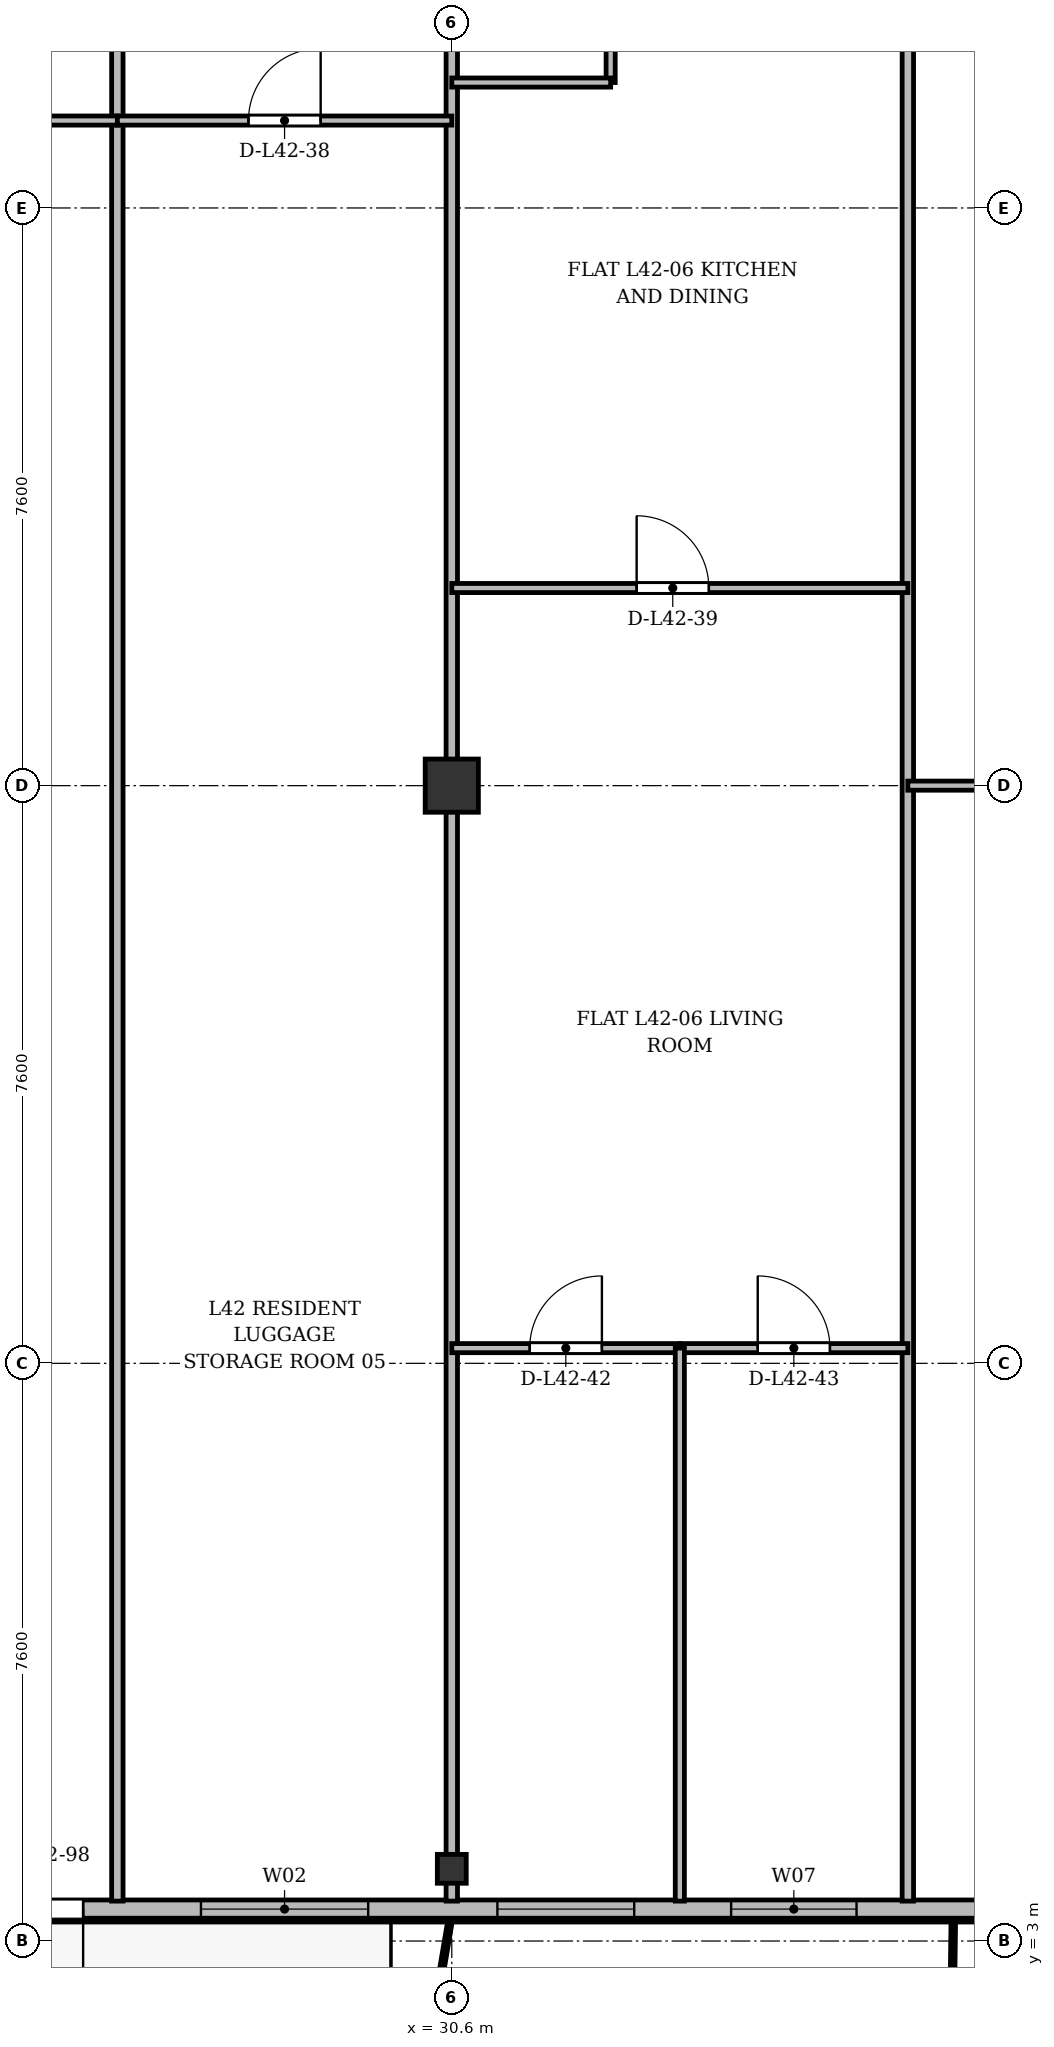
"""IFC4 building model, lengths in metres.
Left out: names, types, materials, properties, quantities, classifications, styles, units other than length and angle.
Written with IfcOpenShell. Run it as: python <this file> out.ifc"""

import sys

from ifc_helpers import new_model, si_unit, direction, frame, frame_2d, origin, origin_2d, place, context, subcontext, project, spatial, rectangle, i_section, extrude, source, transform, mapped, element, fill, save


model = new_model("IFC4")
c1 = context("Model", 3, precision=1e-05, world=origin(), true_north=direction((0.0, 1.0)))
c2 = subcontext(c1, "Body", "Model", "MODEL_VIEW")
j1 = project(units=[si_unit("LENGTHUNIT", "METRE"), si_unit("PLANEANGLEUNIT", "RADIAN")], contexts=[c1])
p1 = place(None, origin())
s1 = spatial("IfcSite", under=j1, at=p1, CompositionType="ELEMENT")
p2 = place(p1, origin())
s2 = spatial("IfcBuilding", under=s1, at=p2, CompositionType="ELEMENT")
p3 = place(p2, frame((0.0, 0.0, 160.9)))
s3 = spatial("IfcBuildingStorey", under=s2, at=p3, CompositionType="ELEMENT", Elevation=160.9)
m1 = source(origin(), c2, "Body", "SweptSolid", [
    extrude(i_section(OverallWidth=0.38, OverallDepth=0.38, WebThickness=0.02, FlangeThickness=0.03, at=origin_2d()), origin(), (0.0, 0.0, 1.0), 3.6),
])
p4 = place(p3, frame((30.6, 3.95, 0.0), z_axis=(0.0, 0.0, 1.0), x_axis=(1.0, 0.0, 0.0)))
e1 = element("IfcColumn", 1, at=p4, inside=s3, PredefinedType="COLUMN", context=c2, shape_type="MappedRepresentation", body=[
    mapped(m1, transform((0.0, 0.0, 0.0), x_axis=(1.0, 0.0, 0.0), y_axis=(0.0, 1.0, 0.0), z_axis=(0.0, 0.0, 1.0), scale=1.0)),
])
m2 = source(origin(), c2, "Body", "SweptSolid", [
    extrude(rectangle(XDim=0.7, YDim=0.7, at=origin_2d()), origin(), (0.0, 0.0, 1.0), 3.6),
])
p5 = place(p3, frame((30.6, 18.2, 0.0), z_axis=(0.0, 0.0, 1.0), x_axis=(1.0, 0.0, 0.0)))
e2 = element("IfcColumn", 2, at=p5, inside=s3, PredefinedType="COLUMN", context=c2, shape_type="MappedRepresentation", body=[
    mapped(m2, transform((0.0, 0.0, 0.0), x_axis=(1.0, 0.0, 0.0), y_axis=(0.0, 1.0, 0.0), z_axis=(0.0, 0.0, 1.0), scale=1.0)),
])
p6 = place(p3, frame((63.6, 3.42, 0.0), z_axis=(0.0, 0.0, 1.0), x_axis=(-1.0, 0.0, 0.0)))
e3 = element("IfcWall", 3, at=p6, inside=s3, PredefinedType="SOLIDWALL", context=c2, shape_type="SweptSolid", body=[
    extrude(rectangle(XDim=52.8, YDim=0.24, at=frame_2d((26.4, 0.0))), origin(), (0.0, 0.0, 1.0), 3.35),
])
p7 = place(p6, frame((0.295, 0.0, 0.9)))
e4 = element("IfcOpeningElement", 4, at=p7, cuts=e3, PredefinedType="OPENING", context=c2, shape_type="SweptSolid", body=[
    extrude(rectangle(XDim=1.5, YDim=1.75, at=frame_2d((0.75, 0.875))), frame((0.0, 0.13, 0.0), z_axis=(0.0, -1.0, 0.0), x_axis=(1.0, 0.0, 0.0)), (0.0, 0.0, 1.0), 0.26),
])
p8 = place(p6, frame((3.7, 0.0, 0.9)))
e5 = element("IfcOpeningElement", 5, at=p8, cuts=e3, PredefinedType="OPENING", context=c2, shape_type="SweptSolid", body=[
    extrude(rectangle(XDim=2.0, YDim=1.95, at=frame_2d((1.0, 0.975))), frame((0.0, 0.13, 0.0), z_axis=(0.0, -1.0, 0.0), x_axis=(1.0, 0.0, 0.0)), (0.0, 0.0, 1.0), 0.26),
])
p9 = place(p6, frame((7.635, 0.0, 0.0)))
e6 = element("IfcOpeningElement", 6, at=p9, cuts=e3, PredefinedType="OPENING", context=c2, shape_type="SweptSolid", body=[
    extrude(rectangle(XDim=1.2, YDim=2.2, at=frame_2d((0.6, 1.1))), frame((0.0, 0.13, 0.0), z_axis=(0.0, -1.0, 0.0), x_axis=(1.0, 0.0, 0.0)), (0.0, 0.0, 1.0), 0.26),
])
p10 = place(p6, frame((9.7, 0.0, 0.9)))
e7 = element("IfcOpeningElement", 7, at=p10, cuts=e3, PredefinedType="OPENING", context=c2, shape_type="SweptSolid", body=[
    extrude(rectangle(XDim=1.8, YDim=1.8, at=frame_2d((0.9, 0.9))), frame((0.0, 0.13, 0.0), z_axis=(0.0, -1.0, 0.0), x_axis=(1.0, 0.0, 0.0)), (0.0, 0.0, 1.0), 0.26),
])
p11 = place(p6, frame((12.25, 0.0, 0.9)))
e8 = element("IfcOpeningElement", 8, at=p11, cuts=e3, PredefinedType="OPENING", context=c2, shape_type="SweptSolid", body=[
    extrude(rectangle(XDim=1.5, YDim=1.75, at=frame_2d((0.75, 0.875))), frame((0.0, 0.13, 0.0), z_axis=(0.0, -1.0, 0.0), x_axis=(1.0, 0.0, 0.0)), (0.0, 0.0, 1.0), 0.26),
])
p12 = place(p6, frame((16.25, 0.0, 0.9)))
e9 = element("IfcOpeningElement", 9, at=p12, cuts=e3, PredefinedType="OPENING", context=c2, shape_type="SweptSolid", body=[
    extrude(rectangle(XDim=1.5, YDim=1.75, at=frame_2d((0.75, 0.875))), frame((0.0, 0.13, 0.0), z_axis=(0.0, -1.0, 0.0), x_axis=(1.0, 0.0, 0.0)), (0.0, 0.0, 1.0), 0.26),
])
p13 = place(p6, frame((22.4, 0.0, 0.9)))
e10 = element("IfcOpeningElement", 10, at=p13, cuts=e3, PredefinedType="OPENING", context=c2, shape_type="SweptSolid", body=[
    extrude(rectangle(XDim=2.0, YDim=1.95, at=frame_2d((1.0, 0.975))), frame((0.0, 0.13, 0.0), z_axis=(0.0, -1.0, 0.0), x_axis=(1.0, 0.0, 0.0)), (0.0, 0.0, 1.0), 0.26),
])
p14 = place(p6, frame((27.675, 0.0, 0.9)))
e11 = element("IfcOpeningElement", 11, at=p14, cuts=e3, PredefinedType="OPENING", context=c2, shape_type="SweptSolid", body=[
    extrude(rectangle(XDim=1.65, YDim=1.85, at=frame_2d((0.825, 0.925))), frame((0.0, 0.13, 0.0), z_axis=(0.0, -1.0, 0.0), x_axis=(1.0, 0.0, 0.0)), (0.0, 0.0, 1.0), 0.26),
])
p15 = place(p6, frame((30.6, 0.0, 0.9)))
e12 = element("IfcOpeningElement", 12, at=p15, cuts=e3, PredefinedType="OPENING", context=c2, shape_type="SweptSolid", body=[
    extrude(rectangle(XDim=1.8, YDim=1.8, at=frame_2d((0.9, 0.9))), frame((0.0, 0.13, 0.0), z_axis=(0.0, -1.0, 0.0), x_axis=(1.0, 0.0, 0.0)), (0.0, 0.0, 1.0), 0.26),
])
p16 = place(p6, frame((34.1, 0.0, 0.9)))
e13 = element("IfcOpeningElement", 13, at=p16, cuts=e3, PredefinedType="OPENING", context=c2, shape_type="SweptSolid", body=[
    extrude(rectangle(XDim=2.2, YDim=1.8, at=frame_2d((1.1, 0.9))), frame((0.0, 0.13, 0.0), z_axis=(0.0, -1.0, 0.0), x_axis=(1.0, 0.0, 0.0)), (0.0, 0.0, 1.0), 0.26),
])
p17 = place(p6, frame((39.65, 0.0, 0.9)))
e14 = element("IfcOpeningElement", 14, at=p17, cuts=e3, PredefinedType="OPENING", context=c2, shape_type="SweptSolid", body=[
    extrude(rectangle(XDim=1.5, YDim=1.75, at=frame_2d((0.75, 0.875))), frame((0.0, 0.13, 0.0), z_axis=(0.0, -1.0, 0.0), x_axis=(1.0, 0.0, 0.0)), (0.0, 0.0, 1.0), 0.26),
])
p18 = place(p6, frame((43.65, 0.0, 0.9)))
e15 = element("IfcOpeningElement", 15, at=p18, cuts=e3, PredefinedType="OPENING", context=c2, shape_type="SweptSolid", body=[
    extrude(rectangle(XDim=1.5, YDim=1.75, at=frame_2d((0.75, 0.875))), frame((0.0, 0.13, 0.0), z_axis=(0.0, -1.0, 0.0), x_axis=(1.0, 0.0, 0.0)), (0.0, 0.0, 1.0), 0.26),
])
p19 = place(p6, frame((47.275, 0.0, 0.9)))
e16 = element("IfcOpeningElement", 16, at=p19, cuts=e3, PredefinedType="OPENING", context=c2, shape_type="SweptSolid", body=[
    extrude(rectangle(XDim=1.65, YDim=1.85, at=frame_2d((0.825, 0.925))), frame((0.0, 0.13, 0.0), z_axis=(0.0, -1.0, 0.0), x_axis=(1.0, 0.0, 0.0)), (0.0, 0.0, 1.0), 0.26),
])
p20 = place(p6, frame((51.005, 0.0, 0.9)))
e17 = element("IfcOpeningElement", 17, at=p20, cuts=e3, PredefinedType="OPENING", context=c2, shape_type="SweptSolid", body=[
    extrude(rectangle(XDim=1.5, YDim=1.75, at=frame_2d((0.75, 0.875))), frame((0.0, 0.13, 0.0), z_axis=(0.0, -1.0, 0.0), x_axis=(1.0, 0.0, 0.0)), (0.0, 0.0, 1.0), 0.26),
])
p21 = place(p6, frame((37.85, 0.0, 0.0)))
e18 = element("IfcOpeningElement", 18, at=p21, cuts=e3, PredefinedType="OPENING", context=c2, shape_type="SweptSolid", body=[
    extrude(rectangle(XDim=1.2, YDim=2.2, at=frame_2d((0.6, 1.1))), frame((0.0, 0.13, 0.0), z_axis=(0.0, -1.0, 0.0), x_axis=(1.0, 0.0, 0.0)), (0.0, 0.0, 1.0), 0.26),
])
p22 = place(p3, frame((26.2, 3.525, 0.0), z_axis=(0.0, 0.0, 1.0), x_axis=(0.0, 1.0, 0.0)))
e19 = element("IfcWall", 19, at=p22, inside=s3, PredefinedType="PARTITIONING", context=c2, shape_type="SweptSolid", body=[
    extrude(rectangle(XDim=27.275, YDim=0.15, at=frame_2d((13.638, 0.0))), origin(), (0.0, 0.0, 1.0), 2.75),
])
p23 = place(p3, frame((30.6, 3.525, 0.0), z_axis=(0.0, 0.0, 1.0), x_axis=(0.0, 1.0, 0.0)))
e20 = element("IfcWall", 20, at=p23, inside=s3, PredefinedType="PARTITIONING", context=c2, shape_type="SweptSolid", body=[
    extrude(rectangle(XDim=27.275, YDim=0.15, at=frame_2d((13.638, 0.0))), origin(), (0.0, 0.0, 1.0), 2.85),
])
p24 = place(p3, frame((36.6, 3.525, 0.0), z_axis=(0.0, 0.0, 1.0), x_axis=(0.0, 1.0, 0.0)))
e21 = element("IfcWall", 21, at=p24, inside=s3, PredefinedType="PARTITIONING", context=c2, shape_type="SweptSolid", body=[
    extrude(rectangle(XDim=27.275, YDim=0.15, at=frame_2d((13.638, 0.0))), origin(), (0.0, 0.0, 1.0), 2.75),
])
p25 = place(p3, frame((20.2, 26.95, 0.0), z_axis=(0.0, 0.0, 1.0), x_axis=(1.0, 0.0, 0.0)))
e22 = element("IfcWall", 22, at=p25, inside=s3, PredefinedType="PARTITIONING", context=c2, shape_type="SweptSolid", body=[
    extrude(rectangle(XDim=6.0, YDim=0.12, at=frame_2d((3.0, 0.0))), origin(), (0.0, 0.0, 1.0), 2.85),
])
p26 = place(p25, frame((2.432, 0.0, 0.0)))
e23 = element("IfcOpeningElement", 23, at=p26, cuts=e22, PredefinedType="OPENING", context=c2, shape_type="SweptSolid", body=[
    extrude(rectangle(XDim=0.95, YDim=2.15, at=frame_2d((0.475, 1.075))), frame((0.0, 0.07, 0.0), z_axis=(0.0, -1.0, 0.0), x_axis=(1.0, 0.0, 0.0)), (0.0, 0.0, 1.0), 0.14),
])
p27 = place(p3, frame((26.2, 26.95, 0.0), z_axis=(0.0, 0.0, 1.0), x_axis=(1.0, 0.0, 0.0)))
e24 = element("IfcWall", 24, at=p27, inside=s3, PredefinedType="PARTITIONING", context=c2, shape_type="SweptSolid", body=[
    extrude(rectangle(XDim=4.4, YDim=0.12, at=frame_2d((2.2, 0.0))), origin(), (0.0, 0.0, 1.0), 2.85),
])
p28 = place(p27, frame((1.725, 0.0, 0.0)))
e25 = element("IfcOpeningElement", 25, at=p28, cuts=e24, PredefinedType="OPENING", context=c2, shape_type="SweptSolid", body=[
    extrude(rectangle(XDim=0.95, YDim=2.15, at=frame_2d((0.475, 1.075))), frame((0.0, 0.07, 0.0), z_axis=(0.0, -1.0, 0.0), x_axis=(1.0, 0.0, 0.0)), (0.0, 0.0, 1.0), 0.14),
])
p29 = place(p3, frame((30.6, 20.8, 0.0), z_axis=(0.0, 0.0, 1.0), x_axis=(1.0, 0.0, 0.0)))
e26 = element("IfcWall", 26, at=p29, inside=s3, PredefinedType="PARTITIONING", context=c2, shape_type="SweptSolid", body=[
    extrude(rectangle(XDim=6.0, YDim=0.12, at=frame_2d((3.0, 0.0))), origin(), (0.0, 0.0, 1.0), 2.85),
])
p30 = place(p29, frame((2.432, 0.0, 0.0)))
e27 = element("IfcOpeningElement", 27, at=p30, cuts=e26, PredefinedType="OPENING", context=c2, shape_type="SweptSolid", body=[
    extrude(rectangle(XDim=0.95, YDim=2.15, at=frame_2d((0.475, 1.075))), frame((0.0, 0.07, 0.0), z_axis=(0.0, -1.0, 0.0), x_axis=(1.0, 0.0, 0.0)), (0.0, 0.0, 1.0), 0.14),
])
p31 = place(p3, frame((32.69, 27.45, 0.0), z_axis=(0.0, 0.0, 1.0), x_axis=(0.0, 1.0, 0.0)))
e28 = element("IfcWall", 28, at=p31, inside=s3, PredefinedType="PARTITIONING", context=c2, shape_type="SweptSolid", body=[
    extrude(rectangle(XDim=3.35, YDim=0.12, at=frame_2d((1.675, 0.0))), origin(), (0.0, 0.0, 1.0), 3.35),
])
p32 = place(p31, frame((0.8, 0.0, 0.0)))
e29 = element("IfcOpeningElement", 29, at=p32, cuts=e28, PredefinedType="OPENING", context=c2, shape_type="SweptSolid", body=[
    extrude(rectangle(XDim=0.85, YDim=2.1, at=frame_2d((0.425, 1.05))), frame((0.0, 0.07, 0.0), z_axis=(0.0, -1.0, 0.0), x_axis=(1.0, 0.0, 0.0)), (0.0, 0.0, 1.0), 0.14),
])
p33 = place(p3, frame((30.6, 27.45, 0.0), z_axis=(0.0, 0.0, 1.0), x_axis=(1.0, 0.0, 0.0)))
e30 = element("IfcWall", 30, at=p33, inside=s3, PredefinedType="PARTITIONING", context=c2, shape_type="SweptSolid", body=[
    extrude(rectangle(XDim=2.09, YDim=0.12, at=frame_2d((1.045, 0.0))), origin(), (0.0, 0.0, 1.0), 2.85),
])
p34 = place(p3, frame((30.6, 10.8, 0.0), z_axis=(0.0, 0.0, 1.0), x_axis=(1.0, 0.0, 0.0)))
e31 = element("IfcWall", 31, at=p34, inside=s3, PredefinedType="PARTITIONING", context=c2, shape_type="SweptSolid", body=[
    extrude(rectangle(XDim=3.0, YDim=0.12, at=frame_2d((1.5, 0.0))), origin(), (0.0, 0.0, 1.0), 2.85),
])
p35 = place(p34, frame((1.025, 0.0, 0.0)))
e32 = element("IfcOpeningElement", 32, at=p35, cuts=e31, PredefinedType="OPENING", context=c2, shape_type="SweptSolid", body=[
    extrude(rectangle(XDim=0.95, YDim=2.15, at=frame_2d((0.475, 1.075))), frame((0.0, 0.07, 0.0), z_axis=(0.0, -1.0, 0.0), x_axis=(1.0, 0.0, 0.0)), (0.0, 0.0, 1.0), 0.14),
])
p36 = place(p3, frame((33.6, 10.8, 0.0), z_axis=(0.0, 0.0, 1.0), x_axis=(1.0, 0.0, 0.0)))
e33 = element("IfcWall", 33, at=p36, inside=s3, PredefinedType="PARTITIONING", context=c2, shape_type="SweptSolid", body=[
    extrude(rectangle(XDim=3.0, YDim=0.12, at=frame_2d((1.5, 0.0))), origin(), (0.0, 0.0, 1.0), 3.35),
])
p37 = place(p36, frame((1.025, 0.0, 0.0)))
e34 = element("IfcOpeningElement", 34, at=p37, cuts=e33, PredefinedType="OPENING", context=c2, shape_type="SweptSolid", body=[
    extrude(rectangle(XDim=0.95, YDim=2.15, at=frame_2d((0.475, 1.075))), frame((0.0, 0.07, 0.0), z_axis=(0.0, -1.0, 0.0), x_axis=(1.0, 0.0, 0.0)), (0.0, 0.0, 1.0), 0.14),
])
p38 = place(p3, frame((33.6, 3.525, 0.0), z_axis=(0.0, 0.0, 1.0), x_axis=(0.0, 1.0, 0.0)))
e35 = element("IfcWall", 35, at=p38, inside=s3, PredefinedType="PARTITIONING", context=c2, shape_type="SweptSolid", body=[
    extrude(rectangle(XDim=7.275, YDim=0.12, at=frame_2d((3.638, 0.0))), origin(), (0.0, 0.0, 1.0), 2.75),
])
p39 = place(p3, frame((36.6, 18.2, 0.0), z_axis=(0.0, 0.0, 1.0), x_axis=(1.0, 0.0, 0.0)))
e36 = element("IfcWall", 36, at=p39, inside=s3, PredefinedType="PARTITIONING", context=c2, shape_type="SweptSolid", body=[
    extrude(rectangle(XDim=7.2, YDim=0.12, at=frame_2d((3.6, 0.0))), origin(), (0.0, 0.0, 1.0), 2.75),
])
p40 = place(p39, frame((3.125, 0.0, 0.0)))
e37 = element("IfcOpeningElement", 37, at=p40, cuts=e36, PredefinedType="OPENING", context=c2, shape_type="SweptSolid", body=[
    extrude(rectangle(XDim=0.95, YDim=2.15, at=frame_2d((0.475, 1.075))), frame((0.0, 0.07, 0.0), z_axis=(0.0, -1.0, 0.0), x_axis=(1.0, 0.0, 0.0)), (0.0, 0.0, 1.0), 0.14),
])
m3 = source(origin(), c2, "Body", "SweptSolid", [
    extrude(rectangle(XDim=1.65, YDim=1.85, at=frame_2d((0.825, 0.925))), frame((0.0, 0.03, 0.0), z_axis=(0.0, -1.0, 0.0), x_axis=(1.0, 0.0, 0.0)), (0.0, 0.0, 1.0), 0.06),
])
p41 = place(p14, origin())
e38 = element("IfcWindow", 38, at=p41, inside=s3, PartitioningType="SINGLE_PANEL", PredefinedType="WINDOW", context=c2, shape_type="MappedRepresentation", body=[
    mapped(m3, transform((0.0, 0.0, 0.0), x_axis=(1.0, 0.0, 0.0), y_axis=(0.0, 1.0, 0.0), z_axis=(0.0, 0.0, 1.0), scale=1.0)),
])
fill(e11, e38)
m4 = source(origin(), c2, "Body", "SweptSolid", [
    extrude(rectangle(XDim=1.8, YDim=1.8, at=frame_2d((0.9, 0.9))), frame((0.0, 0.03, 0.0), z_axis=(0.0, -1.0, 0.0), x_axis=(1.0, 0.0, 0.0)), (0.0, 0.0, 1.0), 0.06),
])
p42 = place(p15, origin())
e39 = element("IfcWindow", 39, at=p42, inside=s3, PartitioningType="SINGLE_PANEL", PredefinedType="WINDOW", context=c2, shape_type="MappedRepresentation", body=[
    mapped(m4, transform((0.0, 0.0, 0.0), x_axis=(1.0, 0.0, 0.0), y_axis=(0.0, 1.0, 0.0), z_axis=(0.0, 0.0, 1.0), scale=1.0)),
])
fill(e12, e39)
m5 = source(origin(), c2, "Body", "SweptSolid", [
    extrude(rectangle(XDim=2.2, YDim=1.8, at=frame_2d((1.1, 0.9))), frame((0.0, 0.03, 0.0), z_axis=(0.0, -1.0, 0.0), x_axis=(1.0, 0.0, 0.0)), (0.0, 0.0, 1.0), 0.06),
])
p43 = place(p16, origin())
e40 = element("IfcWindow", 40, at=p43, inside=s3, PartitioningType="SINGLE_PANEL", PredefinedType="WINDOW", context=c2, shape_type="MappedRepresentation", body=[
    mapped(m5, transform((0.0, 0.0, 0.0), x_axis=(1.0, 0.0, 0.0), y_axis=(0.0, 1.0, 0.0), z_axis=(0.0, 0.0, 1.0), scale=1.0)),
])
fill(e13, e40)
m6 = source(origin(), c2, "Body", "SweptSolid", [
    extrude(rectangle(XDim=1.2, YDim=2.2, at=frame_2d((0.6, 1.1))), frame((0.0, 0.025, 0.0), z_axis=(0.0, -1.0, 0.0), x_axis=(1.0, 0.0, 0.0)), (0.0, 0.0, 1.0), 0.05),
])
p44 = place(p21, origin())
e41 = element("IfcDoor", 41, at=p44, inside=s3, OperationType="SINGLE_SWING_LEFT", PredefinedType="DOOR", context=c2, shape_type="MappedRepresentation", body=[
    mapped(m6, transform((0.0, 0.0, 0.0), x_axis=(1.0, 0.0, 0.0), y_axis=(0.0, 1.0, 0.0), z_axis=(0.0, 0.0, 1.0), scale=1.0)),
])
fill(e18, e41)
m7 = source(origin(), c2, "Body", "SweptSolid", [
    extrude(rectangle(XDim=0.95, YDim=2.15, at=frame_2d((0.475, 1.075))), frame((0.0, 0.025, 0.0), z_axis=(0.0, -1.0, 0.0), x_axis=(1.0, 0.0, 0.0)), (0.0, 0.0, 1.0), 0.05),
])
p45 = place(p28, origin())
e42 = element("IfcDoor", 42, at=p45, inside=s3, OperationType="SINGLE_SWING_RIGHT", PredefinedType="DOOR", context=c2, shape_type="MappedRepresentation", body=[
    mapped(m7, transform((0.0, 0.0, 0.0), x_axis=(1.0, 0.0, 0.0), y_axis=(0.0, 1.0, 0.0), z_axis=(0.0, 0.0, 1.0), scale=1.0)),
])
fill(e25, e42)
p46 = place(p30, origin())
e43 = element("IfcDoor", 43, at=p46, inside=s3, OperationType="SINGLE_SWING_LEFT", PredefinedType="DOOR", context=c2, shape_type="MappedRepresentation", body=[
    mapped(m7, transform((0.0, 0.0, 0.0), x_axis=(1.0, 0.0, 0.0), y_axis=(0.0, 1.0, 0.0), z_axis=(0.0, 0.0, 1.0), scale=1.0)),
])
fill(e27, e43)
p47 = place(p35, origin())
e44 = element("IfcDoor", 44, at=p47, inside=s3, OperationType="SINGLE_SWING_RIGHT", PredefinedType="DOOR", context=c2, shape_type="MappedRepresentation", body=[
    mapped(m7, transform((0.0, 0.0, 0.0), x_axis=(1.0, 0.0, 0.0), y_axis=(0.0, 1.0, 0.0), z_axis=(0.0, 0.0, 1.0), scale=1.0)),
])
fill(e32, e44)
p48 = place(p37, origin())
e45 = element("IfcDoor", 45, at=p48, inside=s3, OperationType="SINGLE_SWING_LEFT", PredefinedType="DOOR", context=c2, shape_type="MappedRepresentation", body=[
    mapped(m7, transform((0.0, 0.0, 0.0), x_axis=(1.0, 0.0, 0.0), y_axis=(0.0, 1.0, 0.0), z_axis=(0.0, 0.0, 1.0), scale=1.0)),
])
fill(e34, e45)
save(model, sys.argv[1])
